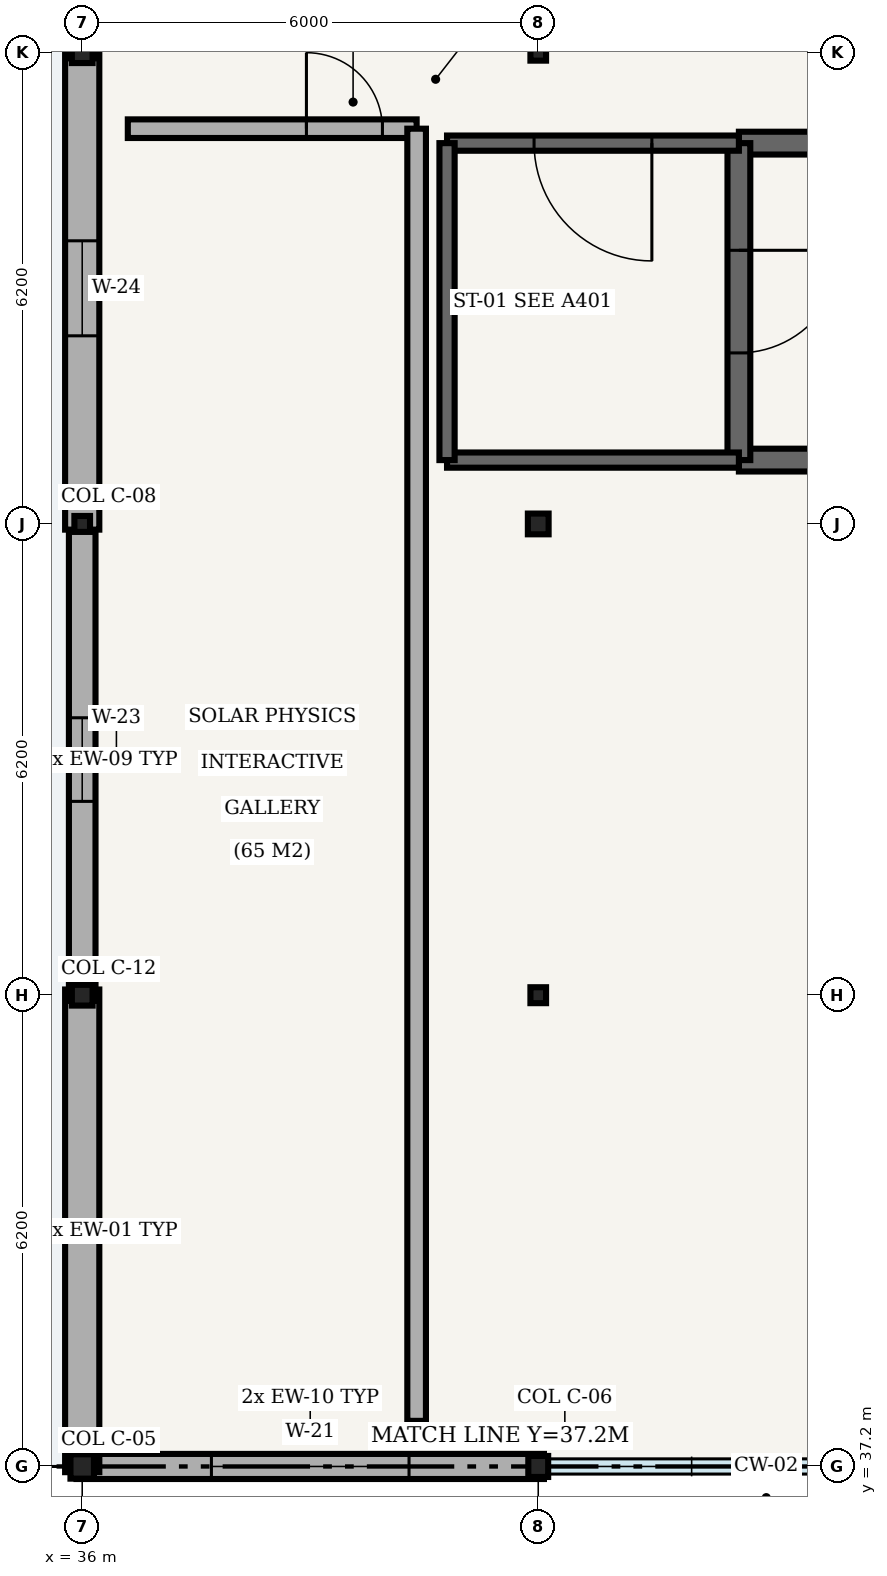
"""IFC4 building model, lengths in metres.
Left out: names, types, materials, properties, quantities, classifications, styles, units other than length and angle.
Written with IfcOpenShell. Run it as: python <this file> out.ifc"""

import sys

from ifc_helpers import new_model, si_unit, direction, frame, frame_2d, origin, origin_2d, place, context, subcontext, project, spatial, rectangle, hollow_circle, i_section, extrude, element, fill, save


model = new_model("IFC4")
c1 = context("Model", 3, precision=1e-05, world=origin(), true_north=direction((0.0, 1.0)))
c2 = subcontext(c1, "Body", "Model", "MODEL_VIEW")
j1 = project(units=[si_unit("LENGTHUNIT", "METRE"), si_unit("PLANEANGLEUNIT", "RADIAN")], contexts=[c1])
p1 = place(None, origin())
s1 = spatial("IfcSite", under=j1, at=p1, CompositionType="ELEMENT")
p2 = place(p1, origin())
s2 = spatial("IfcBuilding", under=s1, at=p2, CompositionType="ELEMENT")
p3 = place(p2, frame((0.0, 0.0, 15.6)))
s3 = spatial("IfcBuildingStorey", under=s2, at=p3, CompositionType="ELEMENT", Elevation=15.6)
p4 = place(p3, frame((36.0, 37.2, 0.0), z_axis=(0.0, 0.0, 1.0), x_axis=(1.0, 0.0, 0.0)))
e1 = element("IfcColumn", 1, at=p4, inside=s3, PredefinedType="COLUMN", context=c2, shape_type="SweptSolid", body=[
    extrude(i_section(OverallWidth=0.309, OverallDepth=0.321, WebThickness=0.014, FlangeThickness=0.022, FilletRadius=0.015, at=origin_2d()), origin(), (0.0, 0.0, 1.0), 4.35),
])
p5 = place(p3, frame((36.0, 43.4, 0.0), z_axis=(0.0, 0.0, 1.0), x_axis=(1.0, 0.0, 0.0)))
e2 = element("IfcColumn", 2, at=p5, inside=s3, PredefinedType="COLUMN", context=c2, shape_type="SweptSolid", body=[
    extrude(hollow_circle(Radius=0.136, WallThickness=0.01, at=origin_2d()), origin(), (0.0, 0.0, 1.0), 4.35),
])
p6 = place(p3, frame((36.0, 49.6, 0.0), z_axis=(0.0, 0.0, 1.0), x_axis=(1.0, 0.0, 0.0)))
e3 = element("IfcColumn", 3, at=p6, inside=s3, PredefinedType="COLUMN", context=c2, shape_type="SweptSolid", body=[
    extrude(i_section(OverallWidth=0.206, OverallDepth=0.21, WebThickness=0.01, FlangeThickness=0.014, FilletRadius=0.01, at=origin_2d()), origin(), (0.0, 0.0, 1.0), 4.35),
])
p7 = place(p3, frame((36.0, 55.8, 0.0), z_axis=(0.0, 0.0, 1.0), x_axis=(1.0, 0.0, 0.0)))
e4 = element("IfcColumn", 4, at=p7, inside=s3, PredefinedType="COLUMN", context=c2, shape_type="SweptSolid", body=[
    extrude(hollow_circle(Radius=0.136, WallThickness=0.01, at=origin_2d()), origin(), (0.0, 0.0, 1.0), 4.35),
])
p8 = place(p3, frame((42.0, 37.2, 0.0), z_axis=(0.0, 0.0, 1.0), x_axis=(1.0, 0.0, 0.0)))
e5 = element("IfcColumn", 5, at=p8, inside=s3, PredefinedType="COLUMN", context=c2, shape_type="SweptSolid", body=[
    extrude(i_section(OverallWidth=0.261, OverallDepth=0.276, WebThickness=0.015, FlangeThickness=0.025, FilletRadius=0.013, at=origin_2d()), origin(), (0.0, 0.0, 1.0), 5.61),
])
p9 = place(p3, frame((42.0, 43.4, 0.0), z_axis=(0.0, 0.0, 1.0), x_axis=(1.0, 0.0, 0.0)))
e6 = element("IfcColumn", 6, at=p9, inside=s3, PredefinedType="COLUMN", context=c2, shape_type="SweptSolid", body=[
    extrude(i_section(OverallWidth=0.206, OverallDepth=0.21, WebThickness=0.01, FlangeThickness=0.014, FilletRadius=0.01, at=origin_2d()), origin(), (0.0, 0.0, 1.0), 5.61),
])
p10 = place(p3, frame((42.0, 49.6, 0.0), z_axis=(0.0, 0.0, 1.0), x_axis=(1.0, 0.0, 0.0)))
e7 = element("IfcColumn", 7, at=p10, inside=s3, PredefinedType="COLUMN", context=c2, shape_type="SweptSolid", body=[
    extrude(hollow_circle(Radius=0.136, WallThickness=0.01, at=origin_2d()), origin(), (0.0, 0.0, 1.0), 5.61),
])
p11 = place(p3, frame((42.0, 55.8, 0.0), z_axis=(0.0, 0.0, 1.0), x_axis=(1.0, 0.0, 0.0)))
e8 = element("IfcColumn", 8, at=p11, inside=s3, PredefinedType="COLUMN", context=c2, shape_type="SweptSolid", body=[
    extrude(i_section(OverallWidth=0.206, OverallDepth=0.21, WebThickness=0.01, FlangeThickness=0.014, FilletRadius=0.01, at=origin_2d()), origin(), (0.0, 0.0, 1.0), 5.61),
])
p12 = place(p3, frame((35.925, 37.2, 0.0), z_axis=(0.0, 0.0, 1.0), x_axis=(1.0, 0.0, 0.0)))
e9 = element("IfcWall", 9, at=p12, inside=s3, PredefinedType="SOLIDWALL", context=c2, shape_type="SweptSolid", body=[
    extrude(rectangle(XDim=6.15, YDim=0.33, at=frame_2d((3.075, 0.0))), origin(), (0.0, 0.0, 1.0), 3.84),
])
p13 = place(p12, frame((1.775, 0.0, 0.9)))
e10 = element("IfcOpeningElement", 10, at=p13, cuts=e9, PredefinedType="OPENING", context=c2, shape_type="SweptSolid", body=[
    extrude(rectangle(XDim=2.6, YDim=1.5, at=frame_2d((1.3, 0.75))), frame((0.0, 0.175, 0.0), z_axis=(0.0, -1.0, 0.0), x_axis=(1.0, 0.0, 0.0)), (0.0, 0.0, 1.0), 0.35),
])
p14 = place(p3, frame((36.0, 43.475, 0.0), z_axis=(0.0, 0.0, 1.0), x_axis=(0.0, -1.0, 0.0)))
e11 = element("IfcWall", 11, at=p14, inside=s3, PredefinedType="SOLIDWALL", context=c2, shape_type="SweptSolid", body=[
    extrude(rectangle(XDim=6.35, YDim=0.45, at=frame_2d((3.175, 0.0))), origin(), (0.0, 0.0, 1.0), 3.84),
])
p15 = place(p3, frame((36.0, 49.675, 0.0), z_axis=(0.0, 0.0, 1.0), x_axis=(0.0, -1.0, 0.0)))
e12 = element("IfcWall", 12, at=p15, inside=s3, PredefinedType="SOLIDWALL", context=c2, shape_type="SweptSolid", body=[
    extrude(rectangle(XDim=6.35, YDim=0.35, at=frame_2d((3.175, 0.0))), origin(), (0.0, 0.0, 1.0), 3.84),
])
p16 = place(p15, frame((2.625, 0.0, 0.9)))
e13 = element("IfcOpeningElement", 13, at=p16, cuts=e12, PredefinedType="OPENING", context=c2, shape_type="SweptSolid", body=[
    extrude(rectangle(XDim=1.1, YDim=1.7, at=frame_2d((0.55, 0.85))), frame((0.0, 0.185, 0.0), z_axis=(0.0, -1.0, 0.0), x_axis=(1.0, 0.0, 0.0)), (0.0, 0.0, 1.0), 0.37),
])
p17 = place(p3, frame((36.0, 55.875, 0.0), z_axis=(0.0, 0.0, 1.0), x_axis=(0.0, -1.0, 0.0)))
e14 = element("IfcWall", 14, at=p17, inside=s3, PredefinedType="SOLIDWALL", context=c2, shape_type="SweptSolid", body=[
    extrude(rectangle(XDim=6.35, YDim=0.45, at=frame_2d((3.175, 0.0))), origin(), (0.0, 0.0, 1.0), 3.84),
])
p18 = place(p17, frame((2.55, 0.0, 0.9)))
e15 = element("IfcOpeningElement", 15, at=p18, cuts=e14, PredefinedType="OPENING", context=c2, shape_type="SweptSolid", body=[
    extrude(rectangle(XDim=1.25, YDim=1.7, at=frame_2d((0.625, 0.85))), frame((0.0, 0.235, 0.0), z_axis=(0.0, -1.0, 0.0), x_axis=(1.0, 0.0, 0.0)), (0.0, 0.0, 1.0), 0.47),
])
p19 = place(p3, frame((36.0, 62.075, 0.0), z_axis=(0.0, 0.0, 1.0), x_axis=(0.0, -1.0, 0.0)))
e16 = element("IfcWall", 16, at=p19, inside=s3, PredefinedType="SOLIDWALL", context=c2, shape_type="SweptSolid", body=[
    extrude(rectangle(XDim=6.35, YDim=0.35, at=frame_2d((3.175, 0.0))), origin(), (0.0, 0.0, 1.0), 3.84),
])
p20 = place(p19, frame((2.475, 0.0, 0.9)))
e17 = element("IfcOpeningElement", 17, at=p20, cuts=e16, PredefinedType="OPENING", context=c2, shape_type="SweptSolid", body=[
    extrude(rectangle(XDim=1.4, YDim=1.7, at=frame_2d((0.7, 0.85))), frame((0.0, 0.185, 0.0), z_axis=(0.0, -1.0, 0.0), x_axis=(1.0, 0.0, 0.0)), (0.0, 0.0, 1.0), 0.37),
])
for number, where, z_axis, x_axis in (
    (18, (44.64, 50.44, 0.0), (0.0, 0.0, 1.0), (1.0, 0.0, 0.0)),
    (19, (53.16, 54.61, 0.0), (0.0, 0.0, 1.0), (-1.0, 0.0, 0.0)),
):
    element("IfcWall", number, at=place(p3, frame(where, z_axis=z_axis, x_axis=x_axis)), inside=s3, PredefinedType="SHEAR", context=c2, shape_type="SweptSolid", body=[
        extrude(rectangle(XDim=8.52, YDim=0.3, at=frame_2d((4.26, 0.0))), origin(), (0.0, 0.0, 1.0), 3.75),
    ])
p21 = place(p3, frame((44.64, 54.61, 0.0), z_axis=(0.0, 0.0, 1.0), x_axis=(0.0, -1.0, 0.0)))
e20 = element("IfcWall", 20, at=p21, inside=s3, PredefinedType="SHEAR", context=c2, shape_type="SweptSolid", body=[
    extrude(rectangle(XDim=4.17, YDim=0.3, at=frame_2d((2.085, 0.0))), origin(), (0.0, 0.0, 1.0), 3.75),
])
p22 = place(p21, frame((1.41, 0.0, 0.0)))
e21 = element("IfcOpeningElement", 21, at=p22, cuts=e20, PredefinedType="OPENING", context=c2, shape_type="SweptSolid", body=[
    extrude(rectangle(XDim=1.35, YDim=2.2, at=frame_2d((0.675, 1.1))), frame((0.0, 0.16, 0.0), z_axis=(0.0, -1.0, 0.0), x_axis=(1.0, 0.0, 0.0)), (0.0, 0.0, 1.0), 0.32),
])
p23 = place(p3, frame((40.8, 50.44, 0.0), z_axis=(0.0, 0.0, 1.0), x_axis=(1.0, 0.0, 0.0)))
e22 = element("IfcWall", 22, at=p23, inside=s3, PredefinedType="SHEAR", context=c2, shape_type="SweptSolid", body=[
    extrude(rectangle(XDim=3.84, YDim=0.2, at=frame_2d((1.92, 0.0))), origin(), (0.0, 0.0, 1.0), 3.75),
])
p24 = place(p3, frame((44.64, 54.61, 0.0), z_axis=(0.0, 0.0, 1.0), x_axis=(-1.0, 0.0, 0.0)))
e23 = element("IfcWall", 23, at=p24, inside=s3, PredefinedType="SHEAR", context=c2, shape_type="SweptSolid", body=[
    extrude(rectangle(XDim=3.84, YDim=0.2, at=frame_2d((1.92, 0.0))), origin(), (0.0, 0.0, 1.0), 3.75),
])
p25 = place(p24, frame((1.145, 0.0, 0.0)))
e24 = element("IfcOpeningElement", 24, at=p25, cuts=e23, PredefinedType="OPENING", context=c2, shape_type="SweptSolid", body=[
    extrude(rectangle(XDim=1.55, YDim=2.2, at=frame_2d((0.775, 1.1))), frame((0.0, 0.11, 0.0), z_axis=(0.0, -1.0, 0.0), x_axis=(1.0, 0.0, 0.0)), (0.0, 0.0, 1.0), 0.22),
])
p26 = place(p3, frame((40.8, 54.61, 0.0), z_axis=(0.0, 0.0, 1.0), x_axis=(0.0, -1.0, 0.0)))
e25 = element("IfcWall", 25, at=p26, inside=s3, PredefinedType="SHEAR", context=c2, shape_type="SweptSolid", body=[
    extrude(rectangle(XDim=4.17, YDim=0.2, at=frame_2d((2.085, 0.0))), origin(), (0.0, 0.0, 1.0), 3.75),
])
p27 = place(p3, frame((36.6, 54.8, 0.0), z_axis=(0.0, 0.0, 1.0), x_axis=(1.0, 0.0, 0.0)))
e26 = element("IfcWall", 26, at=p27, inside=s3, PredefinedType="PARTITIONING", context=c2, shape_type="SweptSolid", body=[
    extrude(rectangle(XDim=3.8, YDim=0.245, at=frame_2d((1.9, 0.0))), origin(), (0.0, 0.0, 1.0), 3.75),
])
p28 = place(p27, frame((2.35, 0.0, 0.0)))
e27 = element("IfcOpeningElement", 27, at=p28, cuts=e26, PredefinedType="OPENING", context=c2, shape_type="SweptSolid", body=[
    extrude(rectangle(XDim=1.0, YDim=2.25, at=frame_2d((0.5, 1.125))), frame((0.0, 0.133, 0.0), z_axis=(0.0, -1.0, 0.0), x_axis=(1.0, 0.0, 0.0)), (0.0, 0.0, 1.0), 0.265),
])
p29 = place(p3, frame((40.4, 54.8, 0.0), z_axis=(0.0, 0.0, 1.0), x_axis=(0.0, -1.0, 0.0)))
e28 = element("IfcWall", 28, at=p29, inside=s3, PredefinedType="PARTITIONING", context=c2, shape_type="SweptSolid", body=[
    extrude(rectangle(XDim=17.0, YDim=0.245, at=frame_2d((8.5, 0.0))), origin(), (0.0, 0.0, 1.0), 3.75),
])
p30 = place(p13, origin())
e29 = element("IfcWindow", 29, at=p30, inside=s3, PartitioningType="DOUBLE_PANEL_VERTICAL", PredefinedType="WINDOW", context=c2, shape_type="SweptSolid", body=[
    extrude(rectangle(XDim=2.6, YDim=1.5, at=frame_2d((1.3, 0.75))), frame((0.0, 0.03, 0.0), z_axis=(0.0, -1.0, 0.0), x_axis=(1.0, 0.0, 0.0)), (0.0, 0.0, 1.0), 0.06),
])
fill(e10, e29)
p31 = place(p16, origin())
e30 = element("IfcWindow", 30, at=p31, inside=s3, PartitioningType="SINGLE_PANEL", PredefinedType="WINDOW", context=c2, shape_type="SweptSolid", body=[
    extrude(rectangle(XDim=1.1, YDim=1.7, at=frame_2d((0.55, 0.85))), frame((0.0, 0.03, 0.0), z_axis=(0.0, -1.0, 0.0), x_axis=(1.0, 0.0, 0.0)), (0.0, 0.0, 1.0), 0.06),
])
fill(e13, e30)
p32 = place(p18, origin())
e31 = element("IfcWindow", 31, at=p32, inside=s3, PartitioningType="SINGLE_PANEL", PredefinedType="WINDOW", context=c2, shape_type="SweptSolid", body=[
    extrude(rectangle(XDim=1.25, YDim=1.7, at=frame_2d((0.625, 0.85))), frame((0.0, 0.03, 0.0), z_axis=(0.0, -1.0, 0.0), x_axis=(1.0, 0.0, 0.0)), (0.0, 0.0, 1.0), 0.06),
])
fill(e15, e31)
p33 = place(p22, origin())
e32 = element("IfcDoor", 32, at=p33, inside=s3, OperationType="SINGLE_SWING_LEFT", PredefinedType="DOOR", context=c2, shape_type="SweptSolid", body=[
    extrude(rectangle(XDim=1.35, YDim=2.2, at=frame_2d((0.675, 1.1))), frame((0.0, 0.025, 0.0), z_axis=(0.0, -1.0, 0.0), x_axis=(1.0, 0.0, 0.0)), (0.0, 0.0, 1.0), 0.05),
])
fill(e21, e32)
p34 = place(p25, origin())
e33 = element("IfcDoor", 33, at=p34, inside=s3, OperationType="SINGLE_SWING_LEFT", PredefinedType="DOOR", context=c2, shape_type="SweptSolid", body=[
    extrude(rectangle(XDim=1.55, YDim=2.2, at=frame_2d((0.775, 1.1))), frame((0.0, 0.025, 0.0), z_axis=(0.0, -1.0, 0.0), x_axis=(1.0, 0.0, 0.0)), (0.0, 0.0, 1.0), 0.05),
])
fill(e24, e33)
p35 = place(p28, origin())
e34 = element("IfcDoor", 34, at=p35, inside=s3, OperationType="SINGLE_SWING_LEFT", PredefinedType="DOOR", context=c2, shape_type="SweptSolid", body=[
    extrude(rectangle(XDim=1.0, YDim=2.25, at=frame_2d((0.5, 1.125))), frame((0.0, 0.025, 0.0), z_axis=(0.0, -1.0, 0.0), x_axis=(1.0, 0.0, 0.0)), (0.0, 0.0, 1.0), 0.05),
])
fill(e27, e34)
save(model, sys.argv[1])
